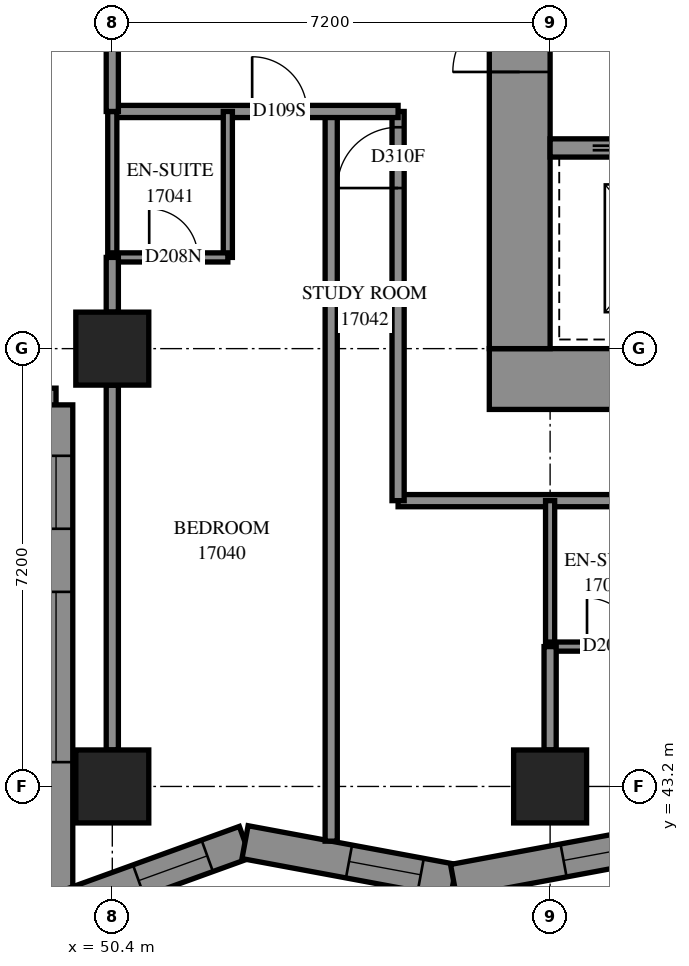
"""IFC4 building model, lengths in metres.
Left out: names, types, materials, properties, quantities, classifications, styles, units other than length and angle.
Written with IfcOpenShell. Run it as: python <this file> out.ifc"""

import sys

from ifc_helpers import new_model, si_unit, direction, frame, frame_2d, origin, origin_2d, place, context, subcontext, project, spatial, polyline, rectangle, outline, extrude, element, fill, save


model = new_model("IFC4")
c1 = context("Model", 3, precision=1e-05, world=origin(), true_north=direction((0.0, 1.0)))
c2 = subcontext(c1, "Body", "Model", "MODEL_VIEW")
j1 = project(units=[si_unit("LENGTHUNIT", "METRE"), si_unit("PLANEANGLEUNIT", "RADIAN")], contexts=[c1])
p1 = place(None, origin())
s1 = spatial("IfcSite", under=j1, at=p1, CompositionType="ELEMENT")
p2 = place(p1, origin())
s2 = spatial("IfcBuilding", under=s1, at=p2, CompositionType="ELEMENT")
p3 = place(p2, frame((0.0, 0.0, 64.4)))
s3 = spatial("IfcBuildingStorey", under=s2, at=p3, CompositionType="ELEMENT", Elevation=64.4)
for number, where, z_axis, x_axis in (
    (1, (50.4, 43.2, 0.0), (0.0, 0.0, 1.0), (1.0, 0.0, 0.0)),
    (2, (50.4, 50.4, 0.0), (0.0, 0.0, 1.0), (1.0, 0.0, 0.0)),
    (3, (57.6, 43.2, 0.0), (0.0, 0.0, 1.0), (1.0, 0.0, 0.0)),
):
    element("IfcColumn", number, at=place(p3, frame(where, z_axis=z_axis, x_axis=x_axis)), inside=s3, PredefinedType="COLUMN", context=c2, shape_type="SweptSolid", body=[
        extrude(rectangle(XDim=1.2, YDim=1.2, at=origin_2d()), origin(), (0.0, 0.0, 1.0), 3.1),
    ])
p4 = place(p3, frame((56.6, 49.9, -0.3), z_axis=(0.0, 0.0, 1.0), x_axis=(1.0, 0.0, 0.0)))
e4 = element("IfcWall", 4, at=p4, inside=s3, PredefinedType="SHEAR", context=c2, shape_type="SweptSolid", body=[
    extrude(rectangle(XDim=16.4, YDim=1.0, at=frame_2d((8.2, 0.0))), origin(), (0.0, 0.0, 1.0), 2.7),
])
p5 = place(p3, frame((57.1, 50.4, -0.3), z_axis=(0.0, 0.0, 1.0), x_axis=(0.0, 1.0, 0.0)))
e5 = element("IfcWall", 5, at=p5, inside=s3, PredefinedType="SHEAR", context=c2, shape_type="SweptSolid", body=[
    extrude(rectangle(XDim=14.4, YDim=1.0, at=frame_2d((7.2, 0.0))), origin(), (0.0, 0.0, 1.0), 2.7),
])
p6 = place(p5, frame((4.55, 0.0, 0.3)))
e6 = element("IfcOpeningElement", 6, at=p6, cuts=e5, PredefinedType="OPENING", context=c2, shape_type="SweptSolid", body=[
    extrude(rectangle(XDim=1.1, YDim=2.1, at=frame_2d((0.55, 1.05))), frame((0.0, 0.51, 0.0), z_axis=(0.0, -1.0, 0.0), x_axis=(1.0, 0.0, 0.0)), (0.0, 0.0, 1.0), 1.02),
])
p7 = place(p5, frame((11.35, 0.0, 0.3)))
e7 = element("IfcOpeningElement", 7, at=p7, cuts=e5, PredefinedType="OPENING", context=c2, shape_type="SweptSolid", body=[
    extrude(rectangle(XDim=1.1, YDim=2.1, at=frame_2d((0.55, 1.05))), frame((0.0, 0.51, 0.0), z_axis=(0.0, -1.0, 0.0), x_axis=(1.0, 0.0, 0.0)), (0.0, 0.0, 1.0), 1.02),
])
p8 = place(p3, frame((57.6, 53.7, 0.0), z_axis=(0.0, 0.0, 1.0), x_axis=(1.0, 0.0, 0.0)))
e8 = element("IfcWall", 8, at=p8, inside=s3, PredefinedType="SOLIDWALL", context=c2, shape_type="SweptSolid", body=[
    extrude(rectangle(XDim=14.4, YDim=0.3, at=frame_2d((7.2, 0.0))), origin(), (0.0, 0.0, 1.0), 3.1),
])
p9 = place(p8, frame((1.25, 0.0, 0.0)))
e9 = element("IfcOpeningElement", 9, at=p9, cuts=e8, PredefinedType="OPENING", context=c2, shape_type="SweptSolid", body=[
    extrude(rectangle(XDim=1.1, YDim=2.1, at=frame_2d((0.55, 1.05))), frame((0.0, 0.16, 0.0), z_axis=(0.0, -1.0, 0.0), x_axis=(1.0, 0.0, 0.0)), (0.0, 0.0, 1.0), 0.32),
])
p10 = place(p8, frame((4.85, 0.0, 0.0)))
e10 = element("IfcOpeningElement", 10, at=p10, cuts=e8, PredefinedType="OPENING", context=c2, shape_type="SweptSolid", body=[
    extrude(rectangle(XDim=1.1, YDim=2.1, at=frame_2d((0.55, 1.05))), frame((0.0, 0.16, 0.0), z_axis=(0.0, -1.0, 0.0), x_axis=(1.0, 0.0, 0.0)), (0.0, 0.0, 1.0), 0.32),
])
p11 = place(p8, frame((8.45, 0.0, 0.0)))
e11 = element("IfcOpeningElement", 11, at=p11, cuts=e8, PredefinedType="OPENING", context=c2, shape_type="SweptSolid", body=[
    extrude(rectangle(XDim=1.1, YDim=2.1, at=frame_2d((0.55, 1.05))), frame((0.0, 0.16, 0.0), z_axis=(0.0, -1.0, 0.0), x_axis=(1.0, 0.0, 0.0)), (0.0, 0.0, 1.0), 0.32),
])
p12 = place(p8, frame((12.05, 0.0, 0.0)))
e12 = element("IfcOpeningElement", 12, at=p12, cuts=e8, PredefinedType="OPENING", context=c2, shape_type="SweptSolid", body=[
    extrude(rectangle(XDim=1.1, YDim=2.1, at=frame_2d((0.55, 1.05))), frame((0.0, 0.16, 0.0), z_axis=(0.0, -1.0, 0.0), x_axis=(1.0, 0.0, 0.0)), (0.0, 0.0, 1.0), 0.32),
])
p13 = place(p3, frame((42.275, 49.475, 0.0), z_axis=(0.0, 0.0, 1.0), x_axis=(1.0, 0.0, 0.0)))
e13 = element("IfcWall", 13, at=p13, inside=s3, PredefinedType="SOLIDWALL", context=c2, shape_type="SweptSolid", body=[
    extrude(outline(polyline([(-0.275, -0.275), (6.925, -0.275), (7.475, 0.275), (0.275, 0.275), (-0.275, -0.275)])), origin(), (0.0, 0.0, 1.0), 3.1),
])
p14 = place(p13, frame((1.325, 0.0, 0.5)))
e14 = element("IfcOpeningElement", 14, at=p14, cuts=e13, PredefinedType="OPENING", context=c2, shape_type="SweptSolid", body=[
    extrude(rectangle(XDim=2.8, YDim=2.45, at=frame_2d((1.4, 1.225))), frame((0.0, 0.285, 0.0), z_axis=(0.0, -1.0, 0.0), x_axis=(1.0, 0.0, 0.0)), (0.0, 0.0, 1.0), 0.57),
])
p15 = place(p13, frame((5.162, 0.0, 0.5)))
e15 = element("IfcOpeningElement", 15, at=p15, cuts=e13, PredefinedType="OPENING", context=c2, shape_type="SweptSolid", body=[
    extrude(rectangle(XDim=1.2, YDim=2.45, at=frame_2d((0.6, 1.225))), frame((0.0, 0.285, 0.0), z_axis=(0.0, -1.0, 0.0), x_axis=(1.0, 0.0, 0.0)), (0.0, 0.0, 1.0), 0.57),
])
p16 = place(p3, frame((49.475, 49.475, 0.0), z_axis=(0.0, 0.0, 1.0), x_axis=(0.0, -1.0, 0.0)))
e16 = element("IfcWall", 16, at=p16, inside=s3, PredefinedType="SOLIDWALL", context=c2, shape_type="SweptSolid", body=[
    extrude(outline(polyline([(0.275, -0.275), (8.708, -0.275), (7.924, 0.275), (-0.275, 0.275), (0.275, -0.275)])), origin(), (0.0, 0.0, 1.0), 3.1),
])
p17 = place(p16, frame((3.075, 0.0, 0.5)))
e17 = element("IfcOpeningElement", 17, at=p17, cuts=e16, PredefinedType="OPENING", context=c2, shape_type="SweptSolid", body=[
    extrude(rectangle(XDim=2.8, YDim=2.45, at=frame_2d((1.4, 1.225))), frame((0.0, 0.285, 0.0), z_axis=(0.0, -1.0, 0.0), x_axis=(1.0, 0.0, 0.0)), (0.0, 0.0, 1.0), 0.57),
])
p18 = place(p16, frame((0.838, 0.0, 0.5)))
e18 = element("IfcOpeningElement", 18, at=p18, cuts=e16, PredefinedType="OPENING", context=c2, shape_type="SweptSolid", body=[
    extrude(rectangle(XDim=1.2, YDim=2.45, at=frame_2d((0.6, 1.225))), frame((0.0, 0.285, 0.0), z_axis=(0.0, -1.0, 0.0), x_axis=(1.0, 0.0, 0.0)), (0.0, 0.0, 1.0), 0.57),
])
p19 = place(p3, frame((49.475, 41.159, 0.0), z_axis=(0.0, 0.0, 1.0), x_axis=(0.9402923967, 0.3403677552, 0.0)))
e19 = element("IfcWall", 19, at=p19, inside=s3, PredefinedType="SOLIDWALL", context=c2, shape_type="SweptSolid", body=[
    extrude(outline(polyline([(-0.392, -0.275), (3.231, -0.275), (3.38, 0.275), (0.392, 0.275), (-0.392, -0.275)])), origin(), (0.0, 0.0, 1.0), 3.1),
])
p20 = place(p19, frame((1.444, 0.0, 0.5)))
e20 = element("IfcOpeningElement", 20, at=p20, cuts=e19, PredefinedType="OPENING", context=c2, shape_type="SweptSolid", body=[
    extrude(rectangle(XDim=1.2, YDim=2.45, at=frame_2d((0.6, 1.225))), frame((0.0, 0.285, 0.0), z_axis=(0.0, -1.0, 0.0), x_axis=(1.0, 0.0, 0.0)), (0.0, 0.0, 1.0), 0.57),
])
p21 = place(p3, frame((52.583, 42.284, 0.0), z_axis=(0.0, 0.0, 1.0), x_axis=(0.9831685115, -0.1827010621, 0.0)))
e21 = element("IfcWall", 21, at=p21, inside=s3, PredefinedType="SOLIDWALL", context=c2, shape_type="SweptSolid", body=[
    extrude(outline(polyline([(0.075, -0.275), (3.539, -0.275), (3.437, 0.275), (-0.075, 0.275), (0.075, -0.275)])), origin(), (0.0, 0.0, 1.0), 3.1),
])
p22 = place(p21, frame((1.739, 0.0, 0.5)))
e22 = element("IfcOpeningElement", 22, at=p22, cuts=e21, PredefinedType="OPENING", context=c2, shape_type="SweptSolid", body=[
    extrude(rectangle(XDim=1.2, YDim=2.45, at=frame_2d((0.6, 1.225))), frame((0.0, 0.285, 0.0), z_axis=(0.0, -1.0, 0.0), x_axis=(1.0, 0.0, 0.0)), (0.0, 0.0, 1.0), 0.57),
])
p23 = place(p3, frame((56.012, 41.647, 0.0), z_axis=(0.0, 0.0, 1.0), x_axis=(0.9831660022, 0.1827145649, 0.0)))
e23 = element("IfcWall", 23, at=p23, inside=s3, PredefinedType="SOLIDWALL", context=c2, shape_type="SweptSolid", body=[
    extrude(outline(polyline([(-0.051, -0.275), (3.413, -0.275), (3.516, 0.275), (0.051, 0.275), (-0.051, -0.275)])), origin(), (0.0, 0.0, 1.0), 3.1),
])
p24 = place(p23, frame((1.84, 0.0, 0.5)))
e24 = element("IfcOpeningElement", 24, at=p24, cuts=e23, PredefinedType="OPENING", context=c2, shape_type="SweptSolid", body=[
    extrude(rectangle(XDim=1.2, YDim=2.45, at=frame_2d((0.6, 1.225))), frame((0.0, 0.285, 0.0), z_axis=(0.0, -1.0, 0.0), x_axis=(1.0, 0.0, 0.0)), (0.0, 0.0, 1.0), 0.57),
])
p25 = place(p3, frame((55.1, 47.9, 0.0), z_axis=(0.0, 0.0, 1.0), x_axis=(1.0, 0.0, 0.0)))
e25 = element("IfcWall", 25, at=p25, inside=s3, PredefinedType="PARTITIONING", context=c2, shape_type="SweptSolid", body=[
    extrude(rectangle(XDim=19.208, YDim=0.2, at=frame_2d((9.604, 0.0))), origin(), (0.0, 0.0, 1.0), 3.1),
])
p26 = place(p25, frame((6.399, 0.0, 0.0)))
e26 = element("IfcOpeningElement", 26, at=p26, cuts=e25, PredefinedType="OPENING", context=c2, shape_type="SweptSolid", body=[
    extrude(rectangle(XDim=0.9, YDim=2.1, at=frame_2d((0.45, 1.05))), frame((0.0, 0.11, 0.0), z_axis=(0.0, -1.0, 0.0), x_axis=(1.0, 0.0, 0.0)), (0.0, 0.0, 1.0), 0.22),
])
p27 = place(p25, frame((13.561, 0.0, 0.0)))
e27 = element("IfcOpeningElement", 27, at=p27, cuts=e25, PredefinedType="OPENING", context=c2, shape_type="SweptSolid", body=[
    extrude(rectangle(XDim=0.9, YDim=2.1, at=frame_2d((0.45, 1.05))), frame((0.0, 0.11, 0.0), z_axis=(0.0, -1.0, 0.0), x_axis=(1.0, 0.0, 0.0)), (0.0, 0.0, 1.0), 0.22),
])
p28 = place(p3, frame((54.0, 42.3, 0.0), z_axis=(0.0, 0.0, 1.0), x_axis=(0.0, 1.0, 0.0)))
e28 = element("IfcWall", 28, at=p28, inside=s3, PredefinedType="PARTITIONING", context=c2, shape_type="SweptSolid", body=[
    extrude(rectangle(XDim=12.0, YDim=0.2, at=frame_2d((6.0, 0.0))), origin(), (0.0, 0.0, 1.0), 3.1),
])
p29 = place(p3, frame((55.1, 47.9, 0.0), z_axis=(0.0, 0.0, 1.0), x_axis=(0.0, 1.0, 0.0)))
e29 = element("IfcWall", 29, at=p29, inside=s3, PredefinedType="PARTITIONING", context=c2, shape_type="SweptSolid", body=[
    extrude(rectangle(XDim=6.4, YDim=0.2, at=frame_2d((3.2, 0.0))), origin(), (0.0, 0.0, 1.0), 3.1),
])
p30 = place(p29, frame((5.141, 0.0, 0.0)))
e30 = element("IfcOpeningElement", 30, at=p30, cuts=e29, PredefinedType="OPENING", context=c2, shape_type="SweptSolid", body=[
    extrude(rectangle(XDim=1.0, YDim=2.1, at=frame_2d((0.5, 1.05))), frame((0.0, 0.11, 0.0), z_axis=(0.0, -1.0, 0.0), x_axis=(1.0, 0.0, 0.0)), (0.0, 0.0, 1.0), 0.22),
])
p31 = place(p3, frame((50.4, 43.8, 0.0), z_axis=(0.0, 0.0, 1.0), x_axis=(0.0, 1.0, 0.0)))
e31 = element("IfcWall", 31, at=p31, inside=s3, PredefinedType="PARTITIONING", context=c2, shape_type="SweptSolid", body=[
    extrude(rectangle(XDim=6.0, YDim=0.2, at=frame_2d((3.0, 0.0))), origin(), (0.0, 0.0, 1.0), 2.6),
])
p32 = place(p3, frame((50.4, 54.3, 0.0), z_axis=(0.0, 0.0, 1.0), x_axis=(1.0, 0.0, 0.0)))
e32 = element("IfcWall", 32, at=p32, inside=s3, PredefinedType="PARTITIONING", context=c2, shape_type="SweptSolid", body=[
    extrude(rectangle(XDim=4.7, YDim=0.2, at=frame_2d((2.35, 0.0))), origin(), (0.0, 0.0, 1.0), 3.1),
])
p33 = place(p32, frame((2.3, 0.0, 0.0)))
e33 = element("IfcOpeningElement", 33, at=p33, cuts=e32, PredefinedType="OPENING", context=c2, shape_type="SweptSolid", body=[
    extrude(rectangle(XDim=0.9, YDim=2.1, at=frame_2d((0.45, 1.05))), frame((0.0, 0.11, 0.0), z_axis=(0.0, -1.0, 0.0), x_axis=(1.0, 0.0, 0.0)), (0.0, 0.0, 1.0), 0.22),
])
for number, where, z_axis, x_axis in (
    (34, (52.3, 51.9, 0.0), (0.0, 0.0, 1.0), (0.0, 1.0, 0.0)),
    (35, (50.4, 51.9, 0.0), (0.0, 0.0, 1.0), (0.0, 1.0, 0.0)),
    (36, (57.6, 45.5, 0.0), (0.0, 0.0, 1.0), (0.0, 1.0, 0.0)),
):
    element("IfcWall", number, at=place(p3, frame(where, z_axis=z_axis, x_axis=x_axis)), inside=s3, PredefinedType="PARTITIONING", context=c2, shape_type="SweptSolid", body=[
        extrude(rectangle(XDim=2.4, YDim=0.15, at=frame_2d((1.2, 0.0))), origin(), (0.0, 0.0, 1.0), 3.1),
    ])
p34 = place(p3, frame((50.4, 51.9, 0.0), z_axis=(0.0, 0.0, 1.0), x_axis=(1.0, 0.0, 0.0)))
e37 = element("IfcWall", 37, at=p34, inside=s3, PredefinedType="PARTITIONING", context=c2, shape_type="SweptSolid", body=[
    extrude(rectangle(XDim=1.9, YDim=0.15, at=frame_2d((0.95, 0.0))), origin(), (0.0, 0.0, 1.0), 3.1),
])
p35 = place(p34, frame((0.607, 0.0, 0.0)))
e38 = element("IfcOpeningElement", 38, at=p35, cuts=e37, PredefinedType="OPENING", context=c2, shape_type="SweptSolid", body=[
    extrude(rectangle(XDim=0.8, YDim=2.1, at=frame_2d((0.4, 1.05))), frame((0.0, 0.085, 0.0), z_axis=(0.0, -1.0, 0.0), x_axis=(1.0, 0.0, 0.0)), (0.0, 0.0, 1.0), 0.17),
])
p36 = place(p3, frame((57.6, 45.5, 0.0), z_axis=(0.0, 0.0, 1.0), x_axis=(1.0, 0.0, 0.0)))
e39 = element("IfcWall", 39, at=p36, inside=s3, PredefinedType="PARTITIONING", context=c2, shape_type="SweptSolid", body=[
    extrude(rectangle(XDim=1.9, YDim=0.15, at=frame_2d((0.95, 0.0))), origin(), (0.0, 0.0, 1.0), 3.1),
])
p37 = place(p36, frame((0.607, 0.0, 0.0)))
e40 = element("IfcOpeningElement", 40, at=p37, cuts=e39, PredefinedType="OPENING", context=c2, shape_type="SweptSolid", body=[
    extrude(rectangle(XDim=0.8, YDim=2.1, at=frame_2d((0.4, 1.05))), frame((0.0, 0.085, 0.0), z_axis=(0.0, -1.0, 0.0), x_axis=(1.0, 0.0, 0.0)), (0.0, 0.0, 1.0), 0.17),
])
p38 = place(p3, frame((50.4, 54.3, 0.0), z_axis=(0.0, 0.0, 1.0), x_axis=(0.0, 1.0, 0.0)))
e41 = element("IfcWall", 41, at=p38, inside=s3, PredefinedType="PARTITIONING", context=c2, shape_type="SweptSolid", body=[
    extrude(rectangle(XDim=1.8, YDim=0.2, at=frame_2d((0.9, 0.0))), origin(), (0.0, 0.0, 1.0), 3.1),
])
p39 = place(p3, frame((57.6, 43.8, 0.0), z_axis=(0.0, 0.0, 1.0), x_axis=(0.0, 1.0, 0.0)))
e42 = element("IfcWall", 42, at=p39, inside=s3, PredefinedType="PARTITIONING", context=c2, shape_type="SweptSolid", body=[
    extrude(rectangle(XDim=1.7, YDim=0.2, at=frame_2d((0.85, 0.0))), origin(), (0.0, 0.0, 1.0), 3.1),
])
p40 = place(p3, frame((50.4, 51.0, 0.0), z_axis=(0.0, 0.0, 1.0), x_axis=(0.0, 1.0, 0.0)))
e43 = element("IfcWall", 43, at=p40, inside=s3, PredefinedType="PARTITIONING", context=c2, shape_type="SweptSolid", body=[
    extrude(rectangle(XDim=0.9, YDim=0.2, at=frame_2d((0.45, 0.0))), origin(), (0.0, 0.0, 1.0), 3.1),
])
p41 = place(p17, origin())
e44 = element("IfcWindow", 44, at=p41, inside=s3, PartitioningType="SINGLE_PANEL", PredefinedType="WINDOW", context=c2, shape_type="SweptSolid", body=[
    extrude(rectangle(XDim=2.8, YDim=2.45, at=frame_2d((1.4, 1.225))), frame((0.0, 0.155, 0.0), z_axis=(0.0, -1.0, 0.0), x_axis=(1.0, 0.0, 0.0)), (0.0, 0.0, 1.0), 0.06),
])
fill(e17, e44)
p42 = place(p18, origin())
e45 = element("IfcWindow", 45, at=p42, inside=s3, PartitioningType="SINGLE_PANEL", PredefinedType="WINDOW", context=c2, shape_type="SweptSolid", body=[
    extrude(rectangle(XDim=1.2, YDim=2.45, at=frame_2d((0.6, 1.225))), frame((0.0, 0.155, 0.0), z_axis=(0.0, -1.0, 0.0), x_axis=(1.0, 0.0, 0.0)), (0.0, 0.0, 1.0), 0.06),
])
fill(e18, e45)
p43 = place(p20, origin())
e46 = element("IfcWindow", 46, at=p43, inside=s3, PartitioningType="SINGLE_PANEL", PredefinedType="WINDOW", context=c2, shape_type="SweptSolid", body=[
    extrude(rectangle(XDim=1.2, YDim=2.45, at=frame_2d((0.6, 1.225))), frame((0.0, 0.155, 0.0), z_axis=(0.0, -1.0, 0.0), x_axis=(1.0, 0.0, 0.0)), (0.0, 0.0, 1.0), 0.06),
])
fill(e20, e46)
p44 = place(p22, origin())
e47 = element("IfcWindow", 47, at=p44, inside=s3, PartitioningType="SINGLE_PANEL", PredefinedType="WINDOW", context=c2, shape_type="SweptSolid", body=[
    extrude(rectangle(XDim=1.2, YDim=2.45, at=frame_2d((0.6, 1.225))), frame((0.0, 0.155, 0.0), z_axis=(0.0, -1.0, 0.0), x_axis=(1.0, 0.0, 0.0)), (0.0, 0.0, 1.0), 0.06),
])
fill(e22, e47)
p45 = place(p24, origin())
e48 = element("IfcWindow", 48, at=p45, inside=s3, PartitioningType="SINGLE_PANEL", PredefinedType="WINDOW", context=c2, shape_type="SweptSolid", body=[
    extrude(rectangle(XDim=1.2, YDim=2.45, at=frame_2d((0.6, 1.225))), frame((0.0, 0.155, 0.0), z_axis=(0.0, -1.0, 0.0), x_axis=(1.0, 0.0, 0.0)), (0.0, 0.0, 1.0), 0.06),
])
fill(e24, e48)
p46 = place(p6, origin())
e49 = element("IfcDoor", 49, at=p46, inside=s3, OperationType="DOUBLE_DOOR_SINGLE_SWING", PredefinedType="DOOR", context=c2, shape_type="SweptSolid", body=[
    extrude(rectangle(XDim=1.1, YDim=2.1, at=frame_2d((0.55, 1.05))), frame((0.0, 0.025, 0.0), z_axis=(0.0, -1.0, 0.0), x_axis=(1.0, 0.0, 0.0)), (0.0, 0.0, 1.0), 0.05),
])
fill(e6, e49)
p47 = place(p33, origin())
e50 = element("IfcDoor", 50, at=p47, inside=s3, OperationType="SINGLE_SWING_LEFT", PredefinedType="DOOR", context=c2, shape_type="SweptSolid", body=[
    extrude(rectangle(XDim=0.9, YDim=2.1, at=frame_2d((0.45, 1.05))), frame((0.0, 0.025, 0.0), z_axis=(0.0, -1.0, 0.0), x_axis=(1.0, 0.0, 0.0)), (0.0, 0.0, 1.0), 0.05),
])
fill(e33, e50)
p48 = place(p35, origin())
e51 = element("IfcDoor", 51, at=p48, inside=s3, OperationType="SINGLE_SWING_RIGHT", PredefinedType="DOOR", context=c2, shape_type="SweptSolid", body=[
    extrude(rectangle(XDim=0.8, YDim=2.1, at=frame_2d((0.4, 1.05))), frame((0.0, 0.025, 0.0), z_axis=(0.0, -1.0, 0.0), x_axis=(1.0, 0.0, 0.0)), (0.0, 0.0, 1.0), 0.05),
])
fill(e38, e51)
p49 = place(p30, origin())
e52 = element("IfcDoor", 52, at=p49, inside=s3, OperationType="SINGLE_SWING_RIGHT", PredefinedType="DOOR", context=c2, shape_type="SweptSolid", body=[
    extrude(rectangle(XDim=1.0, YDim=2.1, at=frame_2d((0.5, 1.05))), frame((0.0, 0.025, 0.0), z_axis=(0.0, -1.0, 0.0), x_axis=(1.0, 0.0, 0.0)), (0.0, 0.0, 1.0), 0.05),
])
fill(e30, e52)
p50 = place(p37, origin())
e53 = element("IfcDoor", 53, at=p50, inside=s3, OperationType="SINGLE_SWING_RIGHT", PredefinedType="DOOR", context=c2, shape_type="SweptSolid", body=[
    extrude(rectangle(XDim=0.8, YDim=2.1, at=frame_2d((0.4, 1.05))), frame((0.0, 0.025, 0.0), z_axis=(0.0, -1.0, 0.0), x_axis=(1.0, 0.0, 0.0)), (0.0, 0.0, 1.0), 0.05),
])
fill(e40, e53)
save(model, sys.argv[1])
